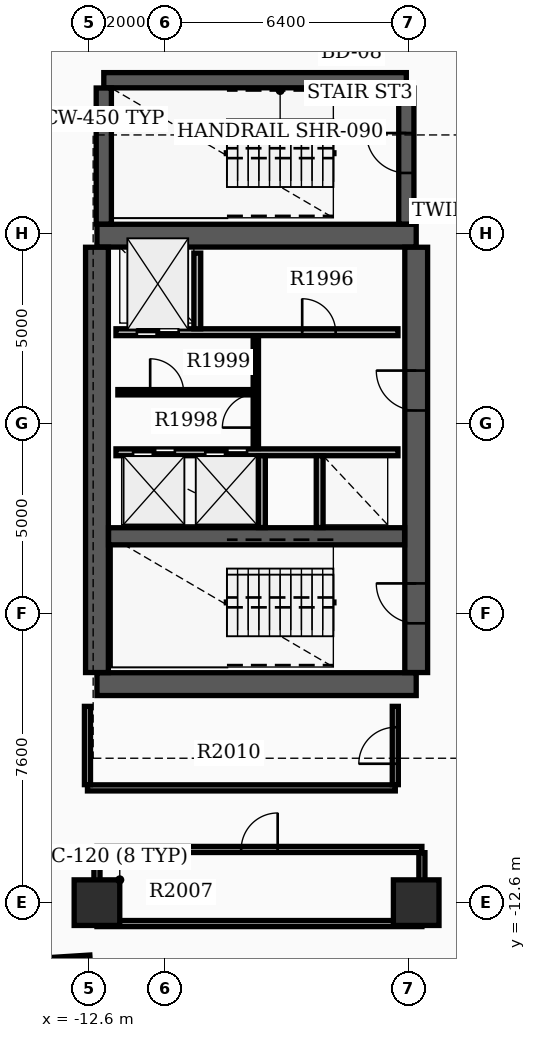
"""IFC4 building model, lengths in metres.
Left out: names, types, materials, properties, quantities, classifications, styles, units other than length and angle.
Written with IfcOpenShell. Run it as: python <this file> out.ifc"""

import sys

from ifc_helpers import new_model, si_unit, direction, frame, frame_2d, origin, origin_2d, place, context, subcontext, project, spatial, rectangle, extrude, element, fill, save


model = new_model("IFC4")
c1 = context("Model", 3, precision=1e-05, world=origin(), true_north=direction((0.0, 1.0)))
c2 = subcontext(c1, "Body", "Model", "MODEL_VIEW")
j1 = project(units=[si_unit("LENGTHUNIT", "METRE"), si_unit("PLANEANGLEUNIT", "RADIAN")], contexts=[c1])
p1 = place(None, origin())
s1 = spatial("IfcSite", under=j1, at=p1, CompositionType="ELEMENT")
p2 = place(p1, origin())
s2 = spatial("IfcBuilding", under=s1, at=p2, CompositionType="ELEMENT")
p3 = place(p2, frame((0.0, 0.0, 128.1)))
s3 = spatial("IfcBuildingStorey", under=s2, at=p3, CompositionType="ELEMENT", Elevation=128.1)
for number, where, z_axis, x_axis in (
    (1, (-12.4, -6.85, 0.0), (0.0, 0.0, 1.0), (1.0, 0.0, 0.0)),
    (2, (-12.4, 4.95, 0.0), (0.0, 0.0, 1.0), (1.0, 0.0, 0.0)),
):
    element("IfcWall", number, at=place(p3, frame(where, z_axis=z_axis, x_axis=x_axis)), inside=s3, PredefinedType="SHEAR", context=c2, shape_type="SweptSolid", body=[
        extrude(rectangle(XDim=8.4, YDim=0.6, at=frame_2d((4.2, 0.0))), origin(), (0.0, 0.0, 1.0), 3.7),
    ])
p4 = place(p3, frame((-12.4, -6.545, 0.0), z_axis=(0.0, 0.0, 1.0), x_axis=(0.0, 1.0, 0.0)))
e3 = element("IfcWall", 3, at=p4, inside=s3, PredefinedType="SHEAR", context=c2, shape_type="SweptSolid", body=[
    extrude(rectangle(XDim=11.19, YDim=0.6, at=frame_2d((5.595, 0.0))), origin(), (0.0, 0.0, 1.0), 3.7),
])
p5 = place(p3, frame((-4.0, -6.545, 0.0), z_axis=(0.0, 0.0, 1.0), x_axis=(0.0, 1.0, 0.0)))
e4 = element("IfcWall", 4, at=p5, inside=s3, PredefinedType="SHEAR", context=c2, shape_type="SweptSolid", body=[
    extrude(rectangle(XDim=11.19, YDim=0.6, at=frame_2d((5.595, 0.0))), origin(), (0.0, 0.0, 1.0), 3.7),
])
p6 = place(p5, frame((1.295, 0.0, 0.0)))
e5 = element("IfcOpeningElement", 5, at=p6, cuts=e4, PredefinedType="OPENING", context=c2, shape_type="SweptSolid", body=[
    extrude(rectangle(XDim=1.05, YDim=2.15, at=frame_2d((0.525, 1.075))), frame((0.0, 0.31, 0.0), z_axis=(0.0, -1.0, 0.0), x_axis=(1.0, 0.0, 0.0)), (0.0, 0.0, 1.0), 0.62),
])
p7 = place(p5, frame((6.895, 0.0, 0.0)))
e6 = element("IfcOpeningElement", 6, at=p7, cuts=e4, PredefinedType="OPENING", context=c2, shape_type="SweptSolid", body=[
    extrude(rectangle(XDim=1.05, YDim=2.15, at=frame_2d((0.525, 1.075))), frame((0.0, 0.31, 0.0), z_axis=(0.0, -1.0, 0.0), x_axis=(1.0, 0.0, 0.0)), (0.0, 0.0, 1.0), 0.62),
])
p8 = place(p3, frame((-12.095, -2.96, 0.0), z_axis=(0.0, 0.0, 1.0), x_axis=(1.0, 0.0, 0.0)))
e7 = element("IfcWall", 7, at=p8, inside=s3, PredefinedType="SHEAR", context=c2, shape_type="SweptSolid", body=[
    extrude(rectangle(XDim=7.79, YDim=0.45, at=frame_2d((3.895, 0.0))), origin(), (0.0, 0.0, 1.0), 3.7),
])
p9 = place(p3, frame((-12.22, 9.04, 0.0), z_axis=(0.0, 0.0, 1.0), x_axis=(1.0, 0.0, 0.0)))
e8 = element("IfcWall", 8, at=p9, inside=s3, PredefinedType="SHEAR", context=c2, shape_type="SweptSolid", body=[
    extrude(rectangle(XDim=7.96, YDim=0.4, at=frame_2d((3.98, 0.0))), origin(), (0.0, 0.0, 1.0), 3.7),
])
p10 = place(p3, frame((-12.22, 5.255, 0.0), z_axis=(0.0, 0.0, 1.0), x_axis=(0.0, 1.0, 0.0)))
e9 = element("IfcWall", 9, at=p10, inside=s3, PredefinedType="SHEAR", context=c2, shape_type="SweptSolid", body=[
    extrude(rectangle(XDim=3.58, YDim=0.4, at=frame_2d((1.79, 0.0))), origin(), (0.0, 0.0, 1.0), 3.7),
])
p11 = place(p3, frame((-4.26, 5.255, 0.0), z_axis=(0.0, 0.0, 1.0), x_axis=(0.0, 1.0, 0.0)))
e10 = element("IfcWall", 10, at=p11, inside=s3, PredefinedType="SHEAR", context=c2, shape_type="SweptSolid", body=[
    extrude(rectangle(XDim=3.58, YDim=0.4, at=frame_2d((1.79, 0.0))), origin(), (0.0, 0.0, 1.0), 3.7),
])
p12 = place(p11, frame((1.345, 0.0, 0.0)))
e11 = element("IfcOpeningElement", 11, at=p12, cuts=e10, PredefinedType="OPENING", context=c2, shape_type="SweptSolid", body=[
    extrude(rectangle(XDim=1.05, YDim=2.15, at=frame_2d((0.525, 1.075))), frame((0.0, 0.21, 0.0), z_axis=(0.0, -1.0, 0.0), x_axis=(1.0, 0.0, 0.0)), (0.0, 0.0, 1.0), 0.42),
])
for number, where, z_axis, x_axis in (
    (12, (-12.4, -12.6, 0.0), (0.0, 0.0, 1.0), (1.0, 0.0, 0.0)),
    (13, (-4.0, -12.6, 0.0), (0.0, 0.0, 1.0), (1.0, 0.0, 0.0)),
):
    element("IfcColumn", number, at=place(p3, frame(where, z_axis=z_axis, x_axis=x_axis)), inside=s3, PredefinedType="COLUMN", context=c2, shape_type="SweptSolid", body=[
        extrude(rectangle(XDim=1.2, YDim=1.2, at=origin_2d()), origin(), (0.0, 0.0, 1.0), 3.9),
    ])
p13 = place(p3, frame((-13.796, -14.194, 0.0), z_axis=(0.0, 0.0, 1.0), x_axis=(0.998023660242, 0.06283926796, 0.0)))
e14 = element("IfcWall", 14, at=p13, inside=s3, PredefinedType="STANDARD", context=c2, shape_type="SweptSolid", body=[
    extrude(rectangle(XDim=1.22, YDim=0.28, at=frame_2d((0.61, 0.0))), origin(), (0.0, 0.0, 1.0), 2.97),
])
p14 = place(p3, frame((-11.9, 2.41, 0.0), z_axis=(0.0, 0.0, 1.0), x_axis=(1.0, 0.0, 0.0)))
e15 = element("IfcWall", 15, at=p14, inside=s3, PredefinedType="SOLIDWALL", context=c2, shape_type="SweptSolid", body=[
    extrude(rectangle(XDim=7.42, YDim=0.18, at=frame_2d((3.71, 0.0))), origin(), (0.0, 0.0, 1.0), 2.96),
])
p15 = place(p14, frame((0.55, 0.0, 0.0)))
e16 = element("IfcOpeningElement", 16, at=p15, cuts=e15, PredefinedType="OPENING", context=c2, shape_type="SweptSolid", body=[
    extrude(rectangle(XDim=1.1, YDim=2.15, at=frame_2d((0.55, 1.075))), frame((0.0, 0.1, 0.0), z_axis=(0.0, -1.0, 0.0), x_axis=(1.0, 0.0, 0.0)), (0.0, 0.0, 1.0), 0.2),
])
p16 = place(p14, frame((4.9, 0.0, 0.0)))
e17 = element("IfcOpeningElement", 17, at=p16, cuts=e15, PredefinedType="OPENING", context=c2, shape_type="SweptSolid", body=[
    extrude(rectangle(XDim=0.88, YDim=2.1, at=frame_2d((0.44, 1.05))), frame((0.0, 0.1, 0.0), z_axis=(0.0, -1.0, 0.0), x_axis=(1.0, 0.0, 0.0)), (0.0, 0.0, 1.0), 0.2),
])
p17 = place(p3, frame((-11.9, -0.75, 0.0), z_axis=(0.0, 0.0, 1.0), x_axis=(1.0, 0.0, 0.0)))
e18 = element("IfcWall", 18, at=p17, inside=s3, PredefinedType="SOLIDWALL", context=c2, shape_type="SweptSolid", body=[
    extrude(rectangle(XDim=7.42, YDim=0.18, at=frame_2d((3.71, 0.0))), origin(), (0.0, 0.0, 1.0), 2.96),
])
p18 = place(p17, frame((0.45, 0.0, 0.0)))
e19 = element("IfcOpeningElement", 19, at=p18, cuts=e18, PredefinedType="OPENING", context=c2, shape_type="SweptSolid", body=[
    extrude(rectangle(XDim=1.1, YDim=2.15, at=frame_2d((0.55, 1.075))), frame((0.0, 0.1, 0.0), z_axis=(0.0, -1.0, 0.0), x_axis=(1.0, 0.0, 0.0)), (0.0, 0.0, 1.0), 0.2),
])
p19 = place(p17, frame((2.35, 0.0, 0.0)))
e20 = element("IfcOpeningElement", 20, at=p19, cuts=e18, PredefinedType="OPENING", context=c2, shape_type="SweptSolid", body=[
    extrude(rectangle(XDim=1.1, YDim=2.15, at=frame_2d((0.55, 1.075))), frame((0.0, 0.1, 0.0), z_axis=(0.0, -1.0, 0.0), x_axis=(1.0, 0.0, 0.0)), (0.0, 0.0, 1.0), 0.2),
])
p20 = place(p3, frame((-9.76, 2.5, 0.0), z_axis=(0.0, 0.0, 1.0), x_axis=(0.0, 1.0, 0.0)))
e21 = element("IfcWall", 21, at=p20, inside=s3, PredefinedType="SOLIDWALL", context=c2, shape_type="SweptSolid", body=[
    extrude(rectangle(XDim=1.99, YDim=0.18, at=frame_2d((0.995, 0.0))), origin(), (0.0, 0.0, 1.0), 2.96),
])
for number, where, z_axis, x_axis in (
    (22, (-8.06, -2.73, 0.0), (0.0, 0.0, 1.0), (0.0, 1.0, 0.0)),
    (23, (-6.54, -2.73, 0.0), (0.0, 0.0, 1.0), (0.0, 1.0, 0.0)),
):
    element("IfcWall", number, at=place(p3, frame(where, z_axis=z_axis, x_axis=x_axis)), inside=s3, PredefinedType="SOLIDWALL", context=c2, shape_type="SweptSolid", body=[
        extrude(rectangle(XDim=1.89, YDim=0.18, at=frame_2d((0.945, 0.0))), origin(), (0.0, 0.0, 1.0), 2.96),
    ])
p21 = place(p3, frame((-8.22, -0.65, 0.0), z_axis=(0.0, 0.0, 1.0), x_axis=(0.0, 1.0, 0.0)))
e24 = element("IfcWall", 24, at=p21, inside=s3, PredefinedType="SOLIDWALL", context=c2, shape_type="SweptSolid", body=[
    extrude(rectangle(XDim=2.96, YDim=0.14, at=frame_2d((1.48, 0.0))), origin(), (0.0, 0.0, 1.0), 2.96),
])
p22 = place(p21, frame((0.55, 0.0, 0.0)))
e25 = element("IfcOpeningElement", 25, at=p22, cuts=e24, PredefinedType="OPENING", context=c2, shape_type="SweptSolid", body=[
    extrude(rectangle(XDim=0.88, YDim=2.1, at=frame_2d((0.44, 1.05))), frame((0.0, 0.08, 0.0), z_axis=(0.0, -1.0, 0.0), x_axis=(1.0, 0.0, 0.0)), (0.0, 0.0, 1.0), 0.16),
])
p23 = place(p3, frame((-11.85, 0.83, 0.0), z_axis=(0.0, 0.0, 1.0), x_axis=(1.0, 0.0, 0.0)))
e26 = element("IfcWall", 26, at=p23, inside=s3, PredefinedType="PARTITIONING", context=c2, shape_type="SweptSolid", body=[
    extrude(rectangle(XDim=3.552, YDim=0.14, at=frame_2d((1.776, 0.0))), origin(), (0.0, 0.0, 1.0), 2.96),
])
p24 = place(p23, frame((0.85, 0.0, 0.0)))
e27 = element("IfcOpeningElement", 27, at=p24, cuts=e26, PredefinedType="OPENING", context=c2, shape_type="SweptSolid", body=[
    extrude(rectangle(XDim=0.88, YDim=2.1, at=frame_2d((0.44, 1.05))), frame((0.0, 0.08, 0.0), z_axis=(0.0, -1.0, 0.0), x_axis=(1.0, 0.0, 0.0)), (0.0, 0.0, 1.0), 0.16),
])
p25 = place(p3, frame((-12.4, -13.15, 0.0), z_axis=(0.0, 0.0, 1.0), x_axis=(1.0, 0.0, 0.0)))
e28 = element("IfcWall", 28, at=p25, inside=s3, PredefinedType="PARTITIONING", context=c2, shape_type="SweptSolid", body=[
    extrude(rectangle(XDim=8.55, YDim=0.16, at=frame_2d((4.275, 0.0))), origin(), (0.0, 0.0, 1.0), 2.96),
])
p26 = place(p3, frame((-12.4, -11.2, 0.0), z_axis=(0.0, 0.0, 1.0), x_axis=(1.0, 0.0, 0.0)))
e29 = element("IfcWall", 29, at=p26, inside=s3, PredefinedType="PARTITIONING", context=c2, shape_type="SweptSolid", body=[
    extrude(rectangle(XDim=8.55, YDim=0.16, at=frame_2d((4.275, 0.0))), origin(), (0.0, 0.0, 1.0), 2.96),
])
p27 = place(p26, frame((3.795, 0.0, 0.0)))
e30 = element("IfcOpeningElement", 30, at=p27, cuts=e29, PredefinedType="OPENING", context=c2, shape_type="SweptSolid", body=[
    extrude(rectangle(XDim=0.96, YDim=2.15, at=frame_2d((0.48, 1.075))), frame((0.0, 0.09, 0.0), z_axis=(0.0, -1.0, 0.0), x_axis=(1.0, 0.0, 0.0)), (0.0, 0.0, 1.0), 0.18),
])
for number, where, z_axis, x_axis in (
    (31, (-12.4, -13.065, 0.0), (0.0, 0.0, 1.0), (0.0, 1.0, 0.0)),
    (32, (-3.85, -13.065, 0.0), (0.0, 0.0, 1.0), (0.0, 1.0, 0.0)),
):
    element("IfcWall", number, at=place(p3, frame(where, z_axis=z_axis, x_axis=x_axis)), inside=s3, PredefinedType="PARTITIONING", context=c2, shape_type="SweptSolid", body=[
        extrude(rectangle(XDim=1.78, YDim=0.16, at=frame_2d((0.89, 0.0))), origin(), (0.0, 0.0, 1.0), 2.96),
    ])
p28 = place(p3, frame((-12.65, -9.58, 0.0), z_axis=(0.0, 0.0, 1.0), x_axis=(1.0, 0.0, 0.0)))
e33 = element("IfcWall", 33, at=p28, inside=s3, PredefinedType="PARTITIONING", context=c2, shape_type="SweptSolid", body=[
    extrude(rectangle(XDim=8.1, YDim=0.16, at=frame_2d((4.05, 0.0))), origin(), (0.0, 0.0, 1.0), 2.96),
])
p29 = place(p3, frame((-12.65, -9.495, 0.0), z_axis=(0.0, 0.0, 1.0), x_axis=(0.0, 1.0, 0.0)))
e34 = element("IfcWall", 34, at=p29, inside=s3, PredefinedType="PARTITIONING", context=c2, shape_type="SweptSolid", body=[
    extrude(rectangle(XDim=2.06, YDim=0.16, at=frame_2d((1.03, 0.0))), origin(), (0.0, 0.0, 1.0), 2.96),
])
p30 = place(p3, frame((-4.55, -9.495, 0.0), z_axis=(0.0, 0.0, 1.0), x_axis=(0.0, 1.0, 0.0)))
e35 = element("IfcWall", 35, at=p30, inside=s3, PredefinedType="PARTITIONING", context=c2, shape_type="SweptSolid", body=[
    extrude(rectangle(XDim=2.06, YDim=0.16, at=frame_2d((1.03, 0.0))), origin(), (0.0, 0.0, 1.0), 2.96),
])
p31 = place(p30, frame((0.55, 0.0, 0.0)))
e36 = element("IfcOpeningElement", 36, at=p31, cuts=e35, PredefinedType="OPENING", context=c2, shape_type="SweptSolid", body=[
    extrude(rectangle(XDim=0.96, YDim=2.15, at=frame_2d((0.48, 1.075))), frame((0.0, 0.09, 0.0), z_axis=(0.0, -1.0, 0.0), x_axis=(1.0, 0.0, 0.0)), (0.0, 0.0, 1.0), 0.18),
])
p32 = place(p6, origin())
e37 = element("IfcDoor", 37, at=p32, inside=s3, OperationType="SINGLE_SWING_RIGHT", PredefinedType="DOOR", context=c2, shape_type="SweptSolid", body=[
    extrude(rectangle(XDim=1.05, YDim=2.15, at=frame_2d((0.525, 1.075))), frame((0.0, 0.025, 0.0), z_axis=(0.0, -1.0, 0.0), x_axis=(1.0, 0.0, 0.0)), (0.0, 0.0, 1.0), 0.05),
])
fill(e5, e37)
p33 = place(p7, origin())
e38 = element("IfcDoor", 38, at=p33, inside=s3, OperationType="SINGLE_SWING_RIGHT", PredefinedType="DOOR", context=c2, shape_type="SweptSolid", body=[
    extrude(rectangle(XDim=1.05, YDim=2.15, at=frame_2d((0.525, 1.075))), frame((0.0, 0.025, 0.0), z_axis=(0.0, -1.0, 0.0), x_axis=(1.0, 0.0, 0.0)), (0.0, 0.0, 1.0), 0.05),
])
fill(e6, e38)
p34 = place(p12, origin())
e39 = element("IfcDoor", 39, at=p34, inside=s3, OperationType="SINGLE_SWING_RIGHT", PredefinedType="DOOR", context=c2, shape_type="SweptSolid", body=[
    extrude(rectangle(XDim=1.05, YDim=2.15, at=frame_2d((0.525, 1.075))), frame((0.0, 0.025, 0.0), z_axis=(0.0, -1.0, 0.0), x_axis=(1.0, 0.0, 0.0)), (0.0, 0.0, 1.0), 0.05),
])
fill(e11, e39)
p35 = place(p15, origin())
e40 = element("IfcDoor", 40, at=p35, inside=s3, OperationType="DOUBLE_DOOR_SLIDING", PredefinedType="DOOR", context=c2, shape_type="SweptSolid", body=[
    extrude(rectangle(XDim=1.1, YDim=2.15, at=frame_2d((0.55, 1.075))), frame((0.0, 0.025, 0.0), z_axis=(0.0, -1.0, 0.0), x_axis=(1.0, 0.0, 0.0)), (0.0, 0.0, 1.0), 0.05),
])
fill(e16, e40)
p36 = place(p18, origin())
e41 = element("IfcDoor", 41, at=p36, inside=s3, OperationType="DOUBLE_DOOR_SLIDING", PredefinedType="DOOR", context=c2, shape_type="SweptSolid", body=[
    extrude(rectangle(XDim=1.1, YDim=2.15, at=frame_2d((0.55, 1.075))), frame((0.0, 0.025, 0.0), z_axis=(0.0, -1.0, 0.0), x_axis=(1.0, 0.0, 0.0)), (0.0, 0.0, 1.0), 0.05),
])
fill(e19, e41)
p37 = place(p19, origin())
e42 = element("IfcDoor", 42, at=p37, inside=s3, OperationType="DOUBLE_DOOR_SLIDING", PredefinedType="DOOR", context=c2, shape_type="SweptSolid", body=[
    extrude(rectangle(XDim=1.1, YDim=2.15, at=frame_2d((0.55, 1.075))), frame((0.0, 0.025, 0.0), z_axis=(0.0, -1.0, 0.0), x_axis=(1.0, 0.0, 0.0)), (0.0, 0.0, 1.0), 0.05),
])
fill(e20, e42)
p38 = place(p16, origin())
e43 = element("IfcDoor", 43, at=p38, inside=s3, OperationType="SINGLE_SWING_LEFT", PredefinedType="DOOR", context=c2, shape_type="SweptSolid", body=[
    extrude(rectangle(XDim=0.88, YDim=2.1, at=frame_2d((0.44, 1.05))), frame((0.0, 0.025, 0.0), z_axis=(0.0, -1.0, 0.0), x_axis=(1.0, 0.0, 0.0)), (0.0, 0.0, 1.0), 0.05),
])
fill(e17, e43)
p39 = place(p22, origin())
e44 = element("IfcDoor", 44, at=p39, inside=s3, OperationType="SINGLE_SWING_LEFT", PredefinedType="DOOR", context=c2, shape_type="SweptSolid", body=[
    extrude(rectangle(XDim=0.88, YDim=2.1, at=frame_2d((0.44, 1.05))), frame((0.0, 0.025, 0.0), z_axis=(0.0, -1.0, 0.0), x_axis=(1.0, 0.0, 0.0)), (0.0, 0.0, 1.0), 0.05),
])
fill(e25, e44)
p40 = place(p24, origin())
e45 = element("IfcDoor", 45, at=p40, inside=s3, OperationType="SINGLE_SWING_LEFT", PredefinedType="DOOR", context=c2, shape_type="SweptSolid", body=[
    extrude(rectangle(XDim=0.88, YDim=2.1, at=frame_2d((0.44, 1.05))), frame((0.0, 0.025, 0.0), z_axis=(0.0, -1.0, 0.0), x_axis=(1.0, 0.0, 0.0)), (0.0, 0.0, 1.0), 0.05),
])
fill(e27, e45)
p41 = place(p27, origin())
e46 = element("IfcDoor", 46, at=p41, inside=s3, OperationType="SINGLE_SWING_RIGHT", PredefinedType="DOOR", context=c2, shape_type="SweptSolid", body=[
    extrude(rectangle(XDim=0.96, YDim=2.15, at=frame_2d((0.48, 1.075))), frame((0.0, 0.025, 0.0), z_axis=(0.0, -1.0, 0.0), x_axis=(1.0, 0.0, 0.0)), (0.0, 0.0, 1.0), 0.05),
])
fill(e30, e46)
p42 = place(p31, origin())
e47 = element("IfcDoor", 47, at=p42, inside=s3, OperationType="SINGLE_SWING_LEFT", PredefinedType="DOOR", context=c2, shape_type="SweptSolid", body=[
    extrude(rectangle(XDim=0.96, YDim=2.15, at=frame_2d((0.48, 1.075))), frame((0.0, 0.025, 0.0), z_axis=(0.0, -1.0, 0.0), x_axis=(1.0, 0.0, 0.0)), (0.0, 0.0, 1.0), 0.05),
])
fill(e36, e47)
save(model, sys.argv[1])
